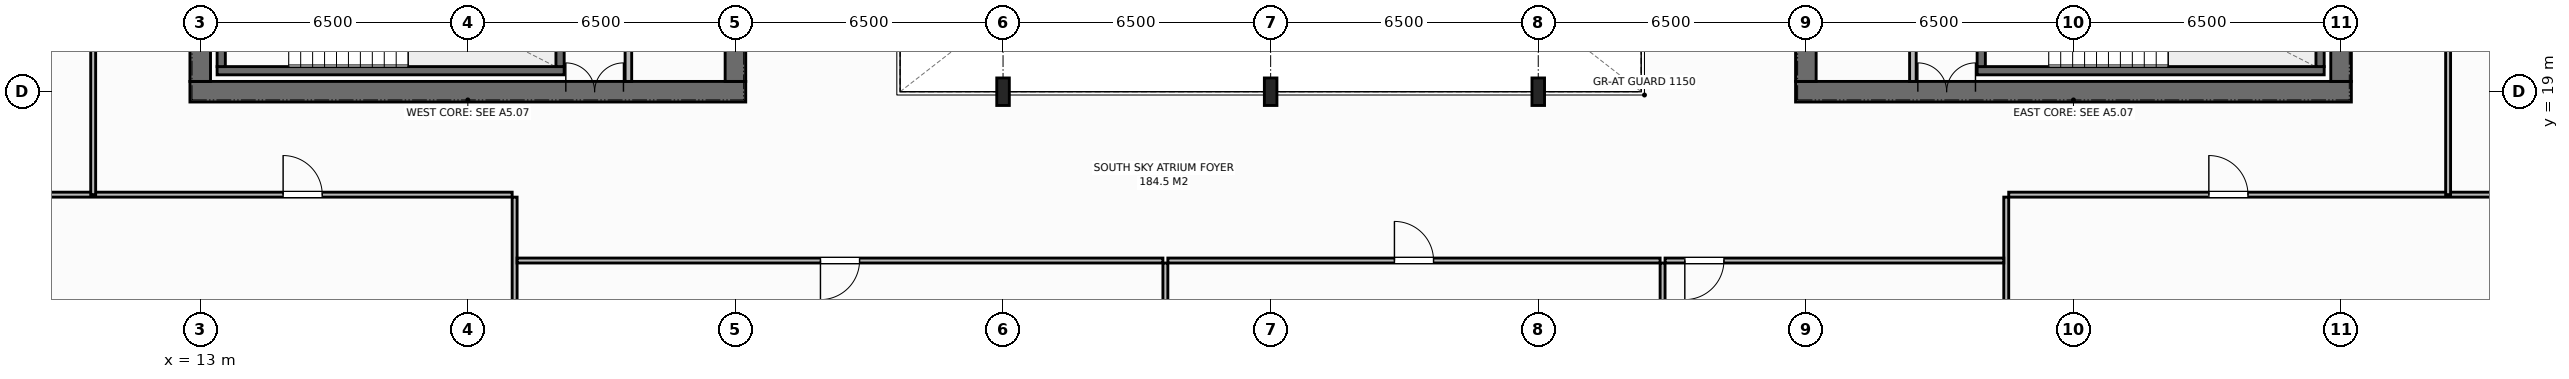
"""IFC4 building model, lengths in metres.
Left out: names, types, materials, properties, quantities, classifications, styles, units other than length and angle.
Written with IfcOpenShell. Run it as: python <this file> out.ifc"""

import sys

from ifc_helpers import new_model, si_unit, direction, frame, frame_2d, origin, origin_2d, place, context, subcontext, project, spatial, rectangle, i_section, extrude, element, fill, save


model = new_model("IFC4")
c1 = context("Model", 3, precision=1e-05, world=origin(), true_north=direction((0.0, 1.0)))
c2 = subcontext(c1, "Body", "Model", "MODEL_VIEW")
j1 = project(units=[si_unit("LENGTHUNIT", "METRE"), si_unit("PLANEANGLEUNIT", "RADIAN")], contexts=[c1])
p1 = place(None, origin())
s1 = spatial("IfcSite", under=j1, at=p1, CompositionType="ELEMENT")
p2 = place(p1, origin())
s2 = spatial("IfcBuilding", under=s1, at=p2, CompositionType="ELEMENT")
p3 = place(p2, frame((0.0, 0.0, 263.2)))
s3 = spatial("IfcBuildingStorey", under=s2, at=p3, CompositionType="ELEMENT", Elevation=263.2)
p4 = place(p3, frame((12.75, 19.0, 0.0), z_axis=(0.0, 0.0, 1.0), x_axis=(1.0, 0.0, 0.0)))
e1 = element("IfcWall", 1, at=p4, inside=s3, PredefinedType="SHEAR", context=c2, shape_type="SweptSolid", body=[
    extrude(rectangle(XDim=13.5, YDim=0.5, at=frame_2d((6.75, 0.0))), origin(), (0.0, 0.0, 1.0), 3.8),
])
p5 = place(p4, frame((9.13, 0.0, 0.0)))
e2 = element("IfcOpeningElement", 2, at=p5, cuts=e1, PredefinedType="OPENING", context=c2, shape_type="SweptSolid", body=[
    extrude(rectangle(XDim=1.4, YDim=2.2, at=frame_2d((0.7, 1.1))), frame((0.0, 0.26, 0.0), z_axis=(0.0, -1.0, 0.0), x_axis=(1.0, 0.0, 0.0)), (0.0, 0.0, 1.0), 0.52),
])
p6 = place(p3, frame((13.0, 19.25, 0.0), z_axis=(0.0, 0.0, 1.0), x_axis=(0.0, 1.0, 0.0)))
e3 = element("IfcWall", 3, at=p6, inside=s3, PredefinedType="SHEAR", context=c2, shape_type="SweptSolid", body=[
    extrude(rectangle(XDim=13.5, YDim=0.5, at=frame_2d((6.75, 0.0))), origin(), (0.0, 0.0, 1.0), 3.8),
])
p7 = place(p6, frame((4.8, 0.0, 0.0)))
e4 = element("IfcOpeningElement", 4, at=p7, cuts=e3, PredefinedType="OPENING", context=c2, shape_type="SweptSolid", body=[
    extrude(rectangle(XDim=1.4, YDim=2.2, at=frame_2d((0.7, 1.1))), frame((0.0, 0.26, 0.0), z_axis=(0.0, -1.0, 0.0), x_axis=(1.0, 0.0, 0.0)), (0.0, 0.0, 1.0), 0.52),
])
p8 = place(p3, frame((26.0, 19.25, 0.0), z_axis=(0.0, 0.0, 1.0), x_axis=(0.0, 1.0, 0.0)))
e5 = element("IfcWall", 5, at=p8, inside=s3, PredefinedType="SHEAR", context=c2, shape_type="SweptSolid", body=[
    extrude(rectangle(XDim=13.5, YDim=0.5, at=frame_2d((6.75, 0.0))), origin(), (0.0, 0.0, 1.0), 3.8),
])
p9 = place(p3, frame((51.75, 19.0, 0.0), z_axis=(0.0, 0.0, 1.0), x_axis=(1.0, 0.0, 0.0)))
e6 = element("IfcWall", 6, at=p9, inside=s3, PredefinedType="SHEAR", context=c2, shape_type="SweptSolid", body=[
    extrude(rectangle(XDim=13.5, YDim=0.5, at=frame_2d((6.75, 0.0))), origin(), (0.0, 0.0, 1.0), 3.8),
])
p10 = place(p9, frame((2.97, 0.0, 0.0)))
e7 = element("IfcOpeningElement", 7, at=p10, cuts=e6, PredefinedType="OPENING", context=c2, shape_type="SweptSolid", body=[
    extrude(rectangle(XDim=1.4, YDim=2.2, at=frame_2d((0.7, 1.1))), frame((0.0, 0.26, 0.0), z_axis=(0.0, -1.0, 0.0), x_axis=(1.0, 0.0, 0.0)), (0.0, 0.0, 1.0), 0.52),
])
p11 = place(p3, frame((52.0, 19.25, 0.0), z_axis=(0.0, 0.0, 1.0), x_axis=(0.0, 1.0, 0.0)))
e8 = element("IfcWall", 8, at=p11, inside=s3, PredefinedType="SHEAR", context=c2, shape_type="SweptSolid", body=[
    extrude(rectangle(XDim=13.5, YDim=0.5, at=frame_2d((6.75, 0.0))), origin(), (0.0, 0.0, 1.0), 3.8),
])
p12 = place(p3, frame((65.0, 19.25, 0.0), z_axis=(0.0, 0.0, 1.0), x_axis=(0.0, 1.0, 0.0)))
e9 = element("IfcWall", 9, at=p12, inside=s3, PredefinedType="SHEAR", context=c2, shape_type="SweptSolid", body=[
    extrude(rectangle(XDim=13.5, YDim=0.5, at=frame_2d((6.75, 0.0))), origin(), (0.0, 0.0, 1.0), 3.8),
])
p13 = place(p12, frame((8.2, 0.0, 0.0)))
e10 = element("IfcOpeningElement", 10, at=p13, cuts=e9, PredefinedType="OPENING", context=c2, shape_type="SweptSolid", body=[
    extrude(rectangle(XDim=1.3, YDim=2.2, at=frame_2d((0.65, 1.1))), frame((0.0, 0.26, 0.0), z_axis=(0.0, -1.0, 0.0), x_axis=(1.0, 0.0, 0.0)), (0.0, 0.0, 1.0), 0.52),
])
p14 = place(p3, frame((13.41, 19.51, 0.0), z_axis=(0.0, 0.0, 1.0), x_axis=(1.0, 0.0, 0.0)))
e11 = element("IfcWall", 11, at=p14, inside=s3, PredefinedType="SHEAR", context=c2, shape_type="SweptSolid", body=[
    extrude(rectangle(XDim=8.43, YDim=0.2, at=frame_2d((4.215, 0.0))), origin(), (0.0, 0.0, 1.0), 3.8),
])
for number, where, z_axis, x_axis in (
    (12, (13.51, 19.61, 0.0), (0.0, 0.0, 1.0), (0.0, 1.0, 0.0)),
    (13, (21.74, 19.61, 0.0), (0.0, 0.0, 1.0), (0.0, 1.0, 0.0)),
):
    element("IfcWall", number, at=place(p3, frame(where, z_axis=z_axis, x_axis=x_axis)), inside=s3, PredefinedType="SHEAR", context=c2, shape_type="SweptSolid", body=[
        extrude(rectangle(XDim=3.28, YDim=0.2, at=frame_2d((1.64, 0.0))), origin(), (0.0, 0.0, 1.0), 3.8),
    ])
p15 = place(p3, frame((56.16, 19.51, 0.0), z_axis=(0.0, 0.0, 1.0), x_axis=(1.0, 0.0, 0.0)))
e14 = element("IfcWall", 14, at=p15, inside=s3, PredefinedType="SHEAR", context=c2, shape_type="SweptSolid", body=[
    extrude(rectangle(XDim=8.43, YDim=0.2, at=frame_2d((4.215, 0.0))), origin(), (0.0, 0.0, 1.0), 3.8),
])
for number, where, z_axis, x_axis in (
    (15, (56.26, 19.61, 0.0), (0.0, 0.0, 1.0), (0.0, 1.0, 0.0)),
    (16, (64.49, 19.61, 0.0), (0.0, 0.0, 1.0), (0.0, 1.0, 0.0)),
):
    element("IfcWall", number, at=place(p3, frame(where, z_axis=z_axis, x_axis=x_axis)), inside=s3, PredefinedType="SHEAR", context=c2, shape_type="SweptSolid", body=[
        extrude(rectangle(XDim=3.28, YDim=0.2, at=frame_2d((1.64, 0.0))), origin(), (0.0, 0.0, 1.0), 3.8),
    ])
for number, where, z_axis, x_axis in (
    (17, (32.5, 19.0, 0.0), (0.0, 0.0, 1.0), (1.0, 0.0, 0.0)),
    (18, (39.0, 19.0, 0.0), (0.0, 0.0, 1.0), (1.0, 0.0, 0.0)),
    (19, (45.5, 19.0, 0.0), (0.0, 0.0, 1.0), (1.0, 0.0, 0.0)),
):
    element("IfcColumn", number, at=place(p3, frame(where, z_axis=z_axis, x_axis=x_axis)), inside=s3, PredefinedType="COLUMN", context=c2, shape_type="SweptSolid", body=[
        extrude(i_section(OverallWidth=0.305, OverallDepth=0.668, WebThickness=0.021, FlangeThickness=0.04, at=origin_2d()), origin(), (0.0, 0.0, 1.0), 3.8),
    ])
p16 = place(p3, frame((23.4, 19.25, 0.0), z_axis=(0.0, 0.0, 1.0), x_axis=(0.0, 1.0, 0.0)))
e20 = element("IfcWall", 20, at=p16, inside=s3, PredefinedType="STANDARD", context=c2, shape_type="SweptSolid", body=[
    extrude(rectangle(XDim=13.5, YDim=0.16, at=frame_2d((6.75, 0.0))), origin(), (0.0, 0.0, 1.0), 3.588),
])
p17 = place(p16, frame((2.25, 0.0, 0.0)))
e21 = element("IfcOpeningElement", 21, at=p17, cuts=e20, PredefinedType="OPENING", context=c2, shape_type="SweptSolid", body=[
    extrude(rectangle(XDim=0.95, YDim=2.15, at=frame_2d((0.475, 1.075))), frame((0.0, 0.09, 0.0), z_axis=(0.0, -1.0, 0.0), x_axis=(1.0, 0.0, 0.0)), (0.0, 0.0, 1.0), 0.18),
])
p18 = place(p16, frame((6.35, 0.0, 0.0)))
e22 = element("IfcOpeningElement", 22, at=p18, cuts=e20, PredefinedType="OPENING", context=c2, shape_type="SweptSolid", body=[
    extrude(rectangle(XDim=0.95, YDim=2.15, at=frame_2d((0.475, 1.075))), frame((0.0, 0.09, 0.0), z_axis=(0.0, -1.0, 0.0), x_axis=(1.0, 0.0, 0.0)), (0.0, 0.0, 1.0), 0.18),
])
p19 = place(p16, frame((9.35, 0.0, 0.0)))
e23 = element("IfcOpeningElement", 23, at=p19, cuts=e20, PredefinedType="OPENING", context=c2, shape_type="SweptSolid", body=[
    extrude(rectangle(XDim=1.1, YDim=2.2, at=frame_2d((0.55, 1.1))), frame((0.0, 0.09, 0.0), z_axis=(0.0, -1.0, 0.0), x_axis=(1.0, 0.0, 0.0)), (0.0, 0.0, 1.0), 0.18),
])
p20 = place(p16, frame((11.55, 0.0, 0.0)))
e24 = element("IfcOpeningElement", 24, at=p20, cuts=e20, PredefinedType="OPENING", context=c2, shape_type="SweptSolid", body=[
    extrude(rectangle(XDim=1.1, YDim=2.2, at=frame_2d((0.55, 1.1))), frame((0.0, 0.09, 0.0), z_axis=(0.0, -1.0, 0.0), x_axis=(1.0, 0.0, 0.0)), (0.0, 0.0, 1.0), 0.18),
])
p21 = place(p3, frame((54.6, 19.25, 0.0), z_axis=(0.0, 0.0, 1.0), x_axis=(0.0, 1.0, 0.0)))
e25 = element("IfcWall", 25, at=p21, inside=s3, PredefinedType="STANDARD", context=c2, shape_type="SweptSolid", body=[
    extrude(rectangle(XDim=13.5, YDim=0.16, at=frame_2d((6.75, 0.0))), origin(), (0.0, 0.0, 1.0), 3.588),
])
p22 = place(p21, frame((2.15, 0.0, 0.0)))
e26 = element("IfcOpeningElement", 26, at=p22, cuts=e25, PredefinedType="OPENING", context=c2, shape_type="SweptSolid", body=[
    extrude(rectangle(XDim=0.95, YDim=2.15, at=frame_2d((0.475, 1.075))), frame((0.0, 0.09, 0.0), z_axis=(0.0, -1.0, 0.0), x_axis=(1.0, 0.0, 0.0)), (0.0, 0.0, 1.0), 0.18),
])
p23 = place(p21, frame((6.25, 0.0, 0.0)))
e27 = element("IfcOpeningElement", 27, at=p23, cuts=e25, PredefinedType="OPENING", context=c2, shape_type="SweptSolid", body=[
    extrude(rectangle(XDim=0.95, YDim=2.15, at=frame_2d((0.475, 1.075))), frame((0.0, 0.09, 0.0), z_axis=(0.0, -1.0, 0.0), x_axis=(1.0, 0.0, 0.0)), (0.0, 0.0, 1.0), 0.18),
])
p24 = place(p21, frame((9.35, 0.0, 0.0)))
e28 = element("IfcOpeningElement", 28, at=p24, cuts=e25, PredefinedType="OPENING", context=c2, shape_type="SweptSolid", body=[
    extrude(rectangle(XDim=1.1, YDim=2.2, at=frame_2d((0.55, 1.1))), frame((0.0, 0.09, 0.0), z_axis=(0.0, -1.0, 0.0), x_axis=(1.0, 0.0, 0.0)), (0.0, 0.0, 1.0), 0.18),
])
p25 = place(p21, frame((11.55, 0.0, 0.0)))
e29 = element("IfcOpeningElement", 29, at=p25, cuts=e25, PredefinedType="OPENING", context=c2, shape_type="SweptSolid", body=[
    extrude(rectangle(XDim=1.1, YDim=2.2, at=frame_2d((0.55, 1.1))), frame((0.0, 0.09, 0.0), z_axis=(0.0, -1.0, 0.0), x_axis=(1.0, 0.0, 0.0)), (0.0, 0.0, 1.0), 0.18),
])
p26 = place(p3, frame((20.637, 5.12, 0.0), z_axis=(0.0, 0.0, 1.0), x_axis=(0.0, 1.0, 0.0)))
e30 = element("IfcWall", 30, at=p26, inside=s3, PredefinedType="PARTITIONING", context=c2, shape_type="SweptSolid", body=[
    extrude(rectangle(XDim=11.32, YDim=0.12, at=frame_2d((5.66, 0.0))), origin(), (0.0, 0.0, 1.0), 3.588),
])
p27 = place(p3, frame((7.38, 16.5, 0.0), z_axis=(0.0, 0.0, 1.0), x_axis=(1.0, 0.0, 0.0)))
e31 = element("IfcWall", 31, at=p27, inside=s3, PredefinedType="PARTITIONING", context=c2, shape_type="SweptSolid", body=[
    extrude(rectangle(XDim=13.197, YDim=0.12, at=frame_2d((6.598, 0.0))), origin(), (0.0, 0.0, 1.0), 3.588),
])
p28 = place(p27, frame((7.633, 0.0, 0.0)))
e32 = element("IfcOpeningElement", 32, at=p28, cuts=e31, PredefinedType="OPENING", context=c2, shape_type="SweptSolid", body=[
    extrude(rectangle(XDim=0.95, YDim=2.15, at=frame_2d((0.475, 1.075))), frame((0.0, 0.07, 0.0), z_axis=(0.0, -1.0, 0.0), x_axis=(1.0, 0.0, 0.0)), (0.0, 0.0, 1.0), 0.14),
])
p29 = place(p3, frame((36.443, 5.12, 0.0), z_axis=(0.0, 0.0, 1.0), x_axis=(0.0, 1.0, 0.0)))
e33 = element("IfcWall", 33, at=p29, inside=s3, PredefinedType="PARTITIONING", context=c2, shape_type="SweptSolid", body=[
    extrude(rectangle(XDim=9.72, YDim=0.12, at=frame_2d((4.86, 0.0))), origin(), (0.0, 0.0, 1.0), 3.588),
])
p30 = place(p3, frame((20.697, 14.9, 0.0), z_axis=(0.0, 0.0, 1.0), x_axis=(1.0, 0.0, 0.0)))
e34 = element("IfcWall", 34, at=p30, inside=s3, PredefinedType="PARTITIONING", context=c2, shape_type="SweptSolid", body=[
    extrude(rectangle(XDim=15.687, YDim=0.12, at=frame_2d((7.843, 0.0))), origin(), (0.0, 0.0, 1.0), 3.588),
])
p31 = place(p30, frame((7.368, 0.0, 0.0)))
e35 = element("IfcOpeningElement", 35, at=p31, cuts=e34, PredefinedType="OPENING", context=c2, shape_type="SweptSolid", body=[
    extrude(rectangle(XDim=0.95, YDim=2.15, at=frame_2d((0.475, 1.075))), frame((0.0, 0.07, 0.0), z_axis=(0.0, -1.0, 0.0), x_axis=(1.0, 0.0, 0.0)), (0.0, 0.0, 1.0), 0.14),
])
p32 = place(p3, frame((48.52, 5.12, 0.0), z_axis=(0.0, 0.0, 1.0), x_axis=(0.0, 1.0, 0.0)))
e36 = element("IfcWall", 36, at=p32, inside=s3, PredefinedType="PARTITIONING", context=c2, shape_type="SweptSolid", body=[
    extrude(rectangle(XDim=9.72, YDim=0.12, at=frame_2d((4.86, 0.0))), origin(), (0.0, 0.0, 1.0), 3.588),
])
p33 = place(p3, frame((36.503, 14.9, 0.0), z_axis=(0.0, 0.0, 1.0), x_axis=(1.0, 0.0, 0.0)))
e37 = element("IfcWall", 37, at=p33, inside=s3, PredefinedType="PARTITIONING", context=c2, shape_type="SweptSolid", body=[
    extrude(rectangle(XDim=11.957, YDim=0.12, at=frame_2d((5.979, 0.0))), origin(), (0.0, 0.0, 1.0), 3.588),
])
p34 = place(p33, frame((5.503, 0.0, 0.0)))
e38 = element("IfcOpeningElement", 38, at=p34, cuts=e37, PredefinedType="OPENING", context=c2, shape_type="SweptSolid", body=[
    extrude(rectangle(XDim=0.95, YDim=2.15, at=frame_2d((0.475, 1.075))), frame((0.0, 0.07, 0.0), z_axis=(0.0, -1.0, 0.0), x_axis=(1.0, 0.0, 0.0)), (0.0, 0.0, 1.0), 0.14),
])
p35 = place(p3, frame((56.867, 5.12, 0.0), z_axis=(0.0, 0.0, 1.0), x_axis=(0.0, 1.0, 0.0)))
e39 = element("IfcWall", 39, at=p35, inside=s3, PredefinedType="PARTITIONING", context=c2, shape_type="SweptSolid", body=[
    extrude(rectangle(XDim=11.32, YDim=0.12, at=frame_2d((5.66, 0.0))), origin(), (0.0, 0.0, 1.0), 3.588),
])
p36 = place(p3, frame((48.58, 14.9, 0.0), z_axis=(0.0, 0.0, 1.0), x_axis=(1.0, 0.0, 0.0)))
e40 = element("IfcWall", 40, at=p36, inside=s3, PredefinedType="PARTITIONING", context=c2, shape_type="SweptSolid", body=[
    extrude(rectangle(XDim=8.227, YDim=0.12, at=frame_2d((4.114, 0.0))), origin(), (0.0, 0.0, 1.0), 3.588),
])
p37 = place(p36, frame((0.48, 0.0, 0.0)))
e41 = element("IfcOpeningElement", 41, at=p37, cuts=e40, PredefinedType="OPENING", context=c2, shape_type="SweptSolid", body=[
    extrude(rectangle(XDim=0.95, YDim=2.15, at=frame_2d((0.475, 1.075))), frame((0.0, 0.07, 0.0), z_axis=(0.0, -1.0, 0.0), x_axis=(1.0, 0.0, 0.0)), (0.0, 0.0, 1.0), 0.14),
])
p38 = place(p3, frame((56.927, 16.5, 0.0), z_axis=(0.0, 0.0, 1.0), x_axis=(1.0, 0.0, 0.0)))
e42 = element("IfcWall", 42, at=p38, inside=s3, PredefinedType="PARTITIONING", context=c2, shape_type="SweptSolid", body=[
    extrude(rectangle(XDim=13.882, YDim=0.12, at=frame_2d((6.941, 0.0))), origin(), (0.0, 0.0, 1.0), 3.588),
])
p39 = place(p38, frame((4.861, 0.0, 0.0)))
e43 = element("IfcOpeningElement", 43, at=p39, cuts=e42, PredefinedType="OPENING", context=c2, shape_type="SweptSolid", body=[
    extrude(rectangle(XDim=0.95, YDim=2.15, at=frame_2d((0.475, 1.075))), frame((0.0, 0.07, 0.0), z_axis=(0.0, -1.0, 0.0), x_axis=(1.0, 0.0, 0.0)), (0.0, 0.0, 1.0), 0.14),
])
p40 = place(p3, frame((10.4, 16.5, 0.0), z_axis=(0.0, 0.0, 1.0), x_axis=(0.0, 1.0, 0.0)))
e44 = element("IfcWall", 44, at=p40, inside=s3, PredefinedType="PARTITIONING", context=c2, shape_type="SweptSolid", body=[
    extrude(rectangle(XDim=6.333, YDim=0.12, at=frame_2d((3.167, 0.0))), origin(), (0.0, 0.0, 1.0), 3.588),
])
p41 = place(p40, frame((3.742, 0.0, 0.0)))
e45 = element("IfcOpeningElement", 45, at=p41, cuts=e44, PredefinedType="OPENING", context=c2, shape_type="SweptSolid", body=[
    extrude(rectangle(XDim=0.95, YDim=2.15, at=frame_2d((0.475, 1.075))), frame((0.0, 0.07, 0.0), z_axis=(0.0, -1.0, 0.0), x_axis=(1.0, 0.0, 0.0)), (0.0, 0.0, 1.0), 0.14),
])
p42 = place(p3, frame((67.6, 16.5, 0.0), z_axis=(0.0, 0.0, 1.0), x_axis=(0.0, 1.0, 0.0)))
e46 = element("IfcWall", 46, at=p42, inside=s3, PredefinedType="PARTITIONING", context=c2, shape_type="SweptSolid", body=[
    extrude(rectangle(XDim=19.0, YDim=0.12, at=frame_2d((9.5, 0.0))), origin(), (0.0, 0.0, 1.0), 3.588),
])
p43 = place(p42, frame((9.025, 0.0, 0.0)))
e47 = element("IfcOpeningElement", 47, at=p43, cuts=e46, PredefinedType="OPENING", context=c2, shape_type="SweptSolid", body=[
    extrude(rectangle(XDim=0.95, YDim=2.15, at=frame_2d((0.475, 1.075))), frame((0.0, 0.07, 0.0), z_axis=(0.0, -1.0, 0.0), x_axis=(1.0, 0.0, 0.0)), (0.0, 0.0, 1.0), 0.14),
])
p44 = place(p5, origin())
e48 = element("IfcDoor", 48, at=p44, inside=s3, OperationType="DOUBLE_DOOR_SINGLE_SWING", PredefinedType="DOOR", context=c2, shape_type="SweptSolid", body=[
    extrude(rectangle(XDim=1.4, YDim=2.2, at=frame_2d((0.7, 1.1))), frame((0.0, 0.075, 0.0), z_axis=(0.0, -1.0, 0.0), x_axis=(1.0, 0.0, 0.0)), (0.0, 0.0, 1.0), 0.05),
])
fill(e2, e48)
p45 = place(p10, origin())
e49 = element("IfcDoor", 49, at=p45, inside=s3, OperationType="DOUBLE_DOOR_SINGLE_SWING", PredefinedType="DOOR", context=c2, shape_type="SweptSolid", body=[
    extrude(rectangle(XDim=1.4, YDim=2.2, at=frame_2d((0.7, 1.1))), frame((0.0, 0.075, 0.0), z_axis=(0.0, -1.0, 0.0), x_axis=(1.0, 0.0, 0.0)), (0.0, 0.0, 1.0), 0.05),
])
fill(e7, e49)
p46 = place(p28, origin())
e50 = element("IfcDoor", 50, at=p46, inside=s3, OperationType="SINGLE_SWING_LEFT", PredefinedType="DOOR", context=c2, shape_type="SweptSolid", body=[
    extrude(rectangle(XDim=0.95, YDim=2.15, at=frame_2d((0.475, 1.075))), frame((0.0, 0.025, 0.0), z_axis=(0.0, -1.0, 0.0), x_axis=(1.0, 0.0, 0.0)), (0.0, 0.0, 1.0), 0.05),
])
fill(e32, e50)
p47 = place(p31, origin())
e51 = element("IfcDoor", 51, at=p47, inside=s3, OperationType="SINGLE_SWING_RIGHT", PredefinedType="DOOR", context=c2, shape_type="SweptSolid", body=[
    extrude(rectangle(XDim=0.95, YDim=2.15, at=frame_2d((0.475, 1.075))), frame((0.0, 0.025, 0.0), z_axis=(0.0, -1.0, 0.0), x_axis=(1.0, 0.0, 0.0)), (0.0, 0.0, 1.0), 0.05),
])
fill(e35, e51)
p48 = place(p34, origin())
e52 = element("IfcDoor", 52, at=p48, inside=s3, OperationType="SINGLE_SWING_LEFT", PredefinedType="DOOR", context=c2, shape_type="SweptSolid", body=[
    extrude(rectangle(XDim=0.95, YDim=2.15, at=frame_2d((0.475, 1.075))), frame((0.0, 0.025, 0.0), z_axis=(0.0, -1.0, 0.0), x_axis=(1.0, 0.0, 0.0)), (0.0, 0.0, 1.0), 0.05),
])
fill(e38, e52)
p49 = place(p37, origin())
e53 = element("IfcDoor", 53, at=p49, inside=s3, OperationType="SINGLE_SWING_RIGHT", PredefinedType="DOOR", context=c2, shape_type="SweptSolid", body=[
    extrude(rectangle(XDim=0.95, YDim=2.15, at=frame_2d((0.475, 1.075))), frame((0.0, 0.025, 0.0), z_axis=(0.0, -1.0, 0.0), x_axis=(1.0, 0.0, 0.0)), (0.0, 0.0, 1.0), 0.05),
])
fill(e41, e53)
p50 = place(p39, origin())
e54 = element("IfcDoor", 54, at=p50, inside=s3, OperationType="SINGLE_SWING_LEFT", PredefinedType="DOOR", context=c2, shape_type="SweptSolid", body=[
    extrude(rectangle(XDim=0.95, YDim=2.15, at=frame_2d((0.475, 1.075))), frame((0.0, 0.025, 0.0), z_axis=(0.0, -1.0, 0.0), x_axis=(1.0, 0.0, 0.0)), (0.0, 0.0, 1.0), 0.05),
])
fill(e43, e54)
save(model, sys.argv[1])
